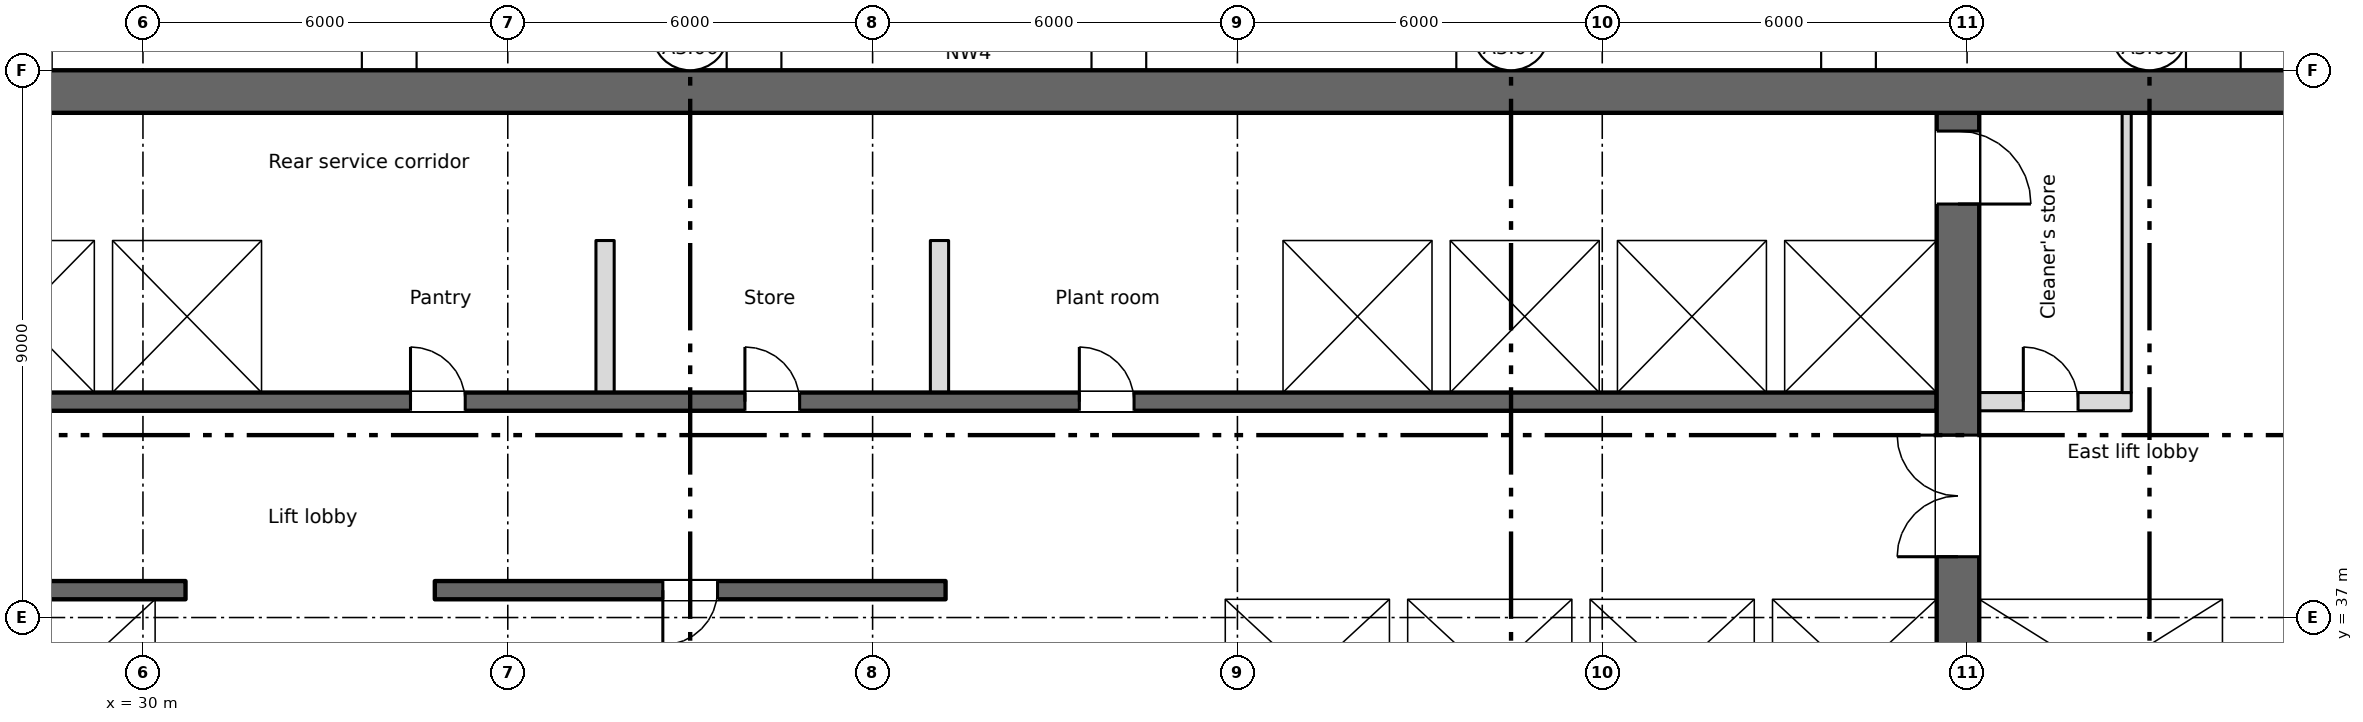
"""IFC4 building model, lengths in metres.
Left out: names, types, materials, properties, quantities, classifications, styles, units other than length and angle.
Written with IfcOpenShell. Run it as: python <this file> out.ifc"""

import sys

from ifc_helpers import new_model, si_unit, direction, frame, frame_2d, origin, place, context, subcontext, project, spatial, rectangle, extrude, element, fill, save


model = new_model("IFC4")
c1 = context("Model", 3, precision=1e-05, world=origin(), true_north=direction((0.0, 1.0)))
c2 = subcontext(c1, "Body", "Model", "MODEL_VIEW")
j1 = project(units=[si_unit("LENGTHUNIT", "METRE"), si_unit("PLANEANGLEUNIT", "RADIAN")], contexts=[c1])
p1 = place(None, origin())
s1 = spatial("IfcSite", under=j1, at=p1, CompositionType="ELEMENT")
p2 = place(p1, origin())
s2 = spatial("IfcBuilding", under=s1, at=p2, CompositionType="ELEMENT")
p3 = place(p2, frame((0.0, 0.0, 166.75)))
s3 = spatial("IfcBuildingStorey", under=s2, at=p3, CompositionType="ELEMENT", Elevation=166.75)
p4 = place(p3, frame((11.55, 45.65, 0.0), z_axis=(0.0, 0.0, 1.0), x_axis=(1.0, 0.0, 0.0)))
e1 = element("IfcWall", 1, at=p4, inside=s3, PredefinedType="SHEAR", context=c2, shape_type="SweptSolid", body=[
    extrude(rectangle(XDim=54.9, YDim=0.7, at=frame_2d((27.45, 0.0))), origin(), (0.0, 0.0, 1.0), 3.35),
])
p5 = place(p3, frame((64.35, 34.8, 0.0), z_axis=(0.0, 0.0, 1.0), x_axis=(0.0, 1.0, 0.0)))
e2 = element("IfcWall", 2, at=p5, inside=s3, PredefinedType="SHEAR", context=c2, shape_type="SweptSolid", body=[
    extrude(rectangle(XDim=10.5, YDim=0.3, at=frame_2d((5.25, 0.0))), origin(), (0.0, 0.0, 1.0), 3.35),
])
p6 = place(p3, frame((59.85, 28.4, 0.0), z_axis=(0.0, 0.0, 1.0), x_axis=(0.0, 1.0, 0.0)))
e3 = element("IfcWall", 3, at=p6, inside=s3, PredefinedType="SHEAR", context=c2, shape_type="SweptSolid", body=[
    extrude(rectangle(XDim=16.9, YDim=0.7, at=frame_2d((8.45, 0.0))), origin(), (0.0, 0.0, 1.0), 3.35),
])
p7 = place(p6, frame((9.6, 0.0, 0.0)))
e4 = element("IfcOpeningElement", 4, at=p7, cuts=e3, PredefinedType="OPENING", context=c2, shape_type="SweptSolid", body=[
    extrude(rectangle(XDim=2.0, YDim=2.1, at=frame_2d((1.0, 1.05))), frame((0.0, 0.36, 0.0), z_axis=(0.0, -1.0, 0.0), x_axis=(1.0, 0.0, 0.0)), (0.0, 0.0, 1.0), 0.72),
])
p8 = place(p6, frame((15.4, 0.0, 0.0)))
e5 = element("IfcOpeningElement", 5, at=p8, cuts=e3, PredefinedType="OPENING", context=c2, shape_type="SweptSolid", body=[
    extrude(rectangle(XDim=1.2, YDim=2.1, at=frame_2d((0.6, 1.05))), frame((0.0, 0.36, 0.0), z_axis=(0.0, -1.0, 0.0), x_axis=(1.0, 0.0, 0.0)), (0.0, 0.0, 1.0), 0.72),
])
p9 = place(p3, frame((30.7, 37.45, 0.0), z_axis=(0.0, 0.0, 1.0), x_axis=(-1.0, 0.0, 0.0)))
e6 = element("IfcWall", 6, at=p9, inside=s3, PredefinedType="SHEAR", context=c2, shape_type="SweptSolid", body=[
    extrude(rectangle(XDim=12.2, YDim=0.3, at=frame_2d((6.1, 0.0))), origin(), (0.0, 0.0, 1.0), 3.35),
])
p10 = place(p9, frame((7.4, 0.0, 0.0)))
e7 = element("IfcOpeningElement", 7, at=p10, cuts=e6, PredefinedType="OPENING", context=c2, shape_type="SweptSolid", body=[
    extrude(rectangle(XDim=0.9, YDim=2.1, at=frame_2d((0.45, 1.05))), frame((0.0, 0.16, 0.0), z_axis=(0.0, -1.0, 0.0), x_axis=(1.0, 0.0, 0.0)), (0.0, 0.0, 1.0), 0.32),
])
p11 = place(p3, frame((43.2, 37.45, 0.0), z_axis=(0.0, 0.0, 1.0), x_axis=(-1.0, 0.0, 0.0)))
e8 = element("IfcWall", 8, at=p11, inside=s3, PredefinedType="SHEAR", context=c2, shape_type="SweptSolid", body=[
    extrude(rectangle(XDim=8.4, YDim=0.3, at=frame_2d((4.2, 0.0))), origin(), (0.0, 0.0, 1.0), 3.35),
])
p12 = place(p11, frame((3.75, 0.0, 0.0)))
e9 = element("IfcOpeningElement", 9, at=p12, cuts=e8, PredefinedType="OPENING", context=c2, shape_type="SweptSolid", body=[
    extrude(rectangle(XDim=0.9, YDim=2.1, at=frame_2d((0.45, 1.05))), frame((0.0, 0.16, 0.0), z_axis=(0.0, -1.0, 0.0), x_axis=(1.0, 0.0, 0.0)), (0.0, 0.0, 1.0), 0.32),
])
p13 = place(p3, frame((47.3, 37.45, 0.0), z_axis=(0.0, 0.0, 1.0), x_axis=(1.0, 0.0, 0.0)))
e10 = element("IfcWall", 10, at=p13, inside=s3, PredefinedType="SHEAR", context=c2, shape_type="SweptSolid", body=[
    extrude(rectangle(XDim=12.2, YDim=0.3, at=frame_2d((6.1, 0.0))), origin(), (0.0, 0.0, 1.0), 3.35),
])
p14 = place(p13, frame((4.3, 0.0, 0.0)))
e11 = element("IfcOpeningElement", 11, at=p14, cuts=e10, PredefinedType="OPENING", context=c2, shape_type="SweptSolid", body=[
    extrude(rectangle(XDim=1.1, YDim=2.1, at=frame_2d((0.55, 1.05))), frame((0.0, 0.16, 0.0), z_axis=(0.0, -1.0, 0.0), x_axis=(1.0, 0.0, 0.0)), (0.0, 0.0, 1.0), 0.32),
])
p15 = place(p13, frame((7.3, 0.0, 0.0)))
e12 = element("IfcOpeningElement", 12, at=p15, cuts=e10, PredefinedType="OPENING", context=c2, shape_type="SweptSolid", body=[
    extrude(rectangle(XDim=1.1, YDim=2.1, at=frame_2d((0.55, 1.05))), frame((0.0, 0.16, 0.0), z_axis=(0.0, -1.0, 0.0), x_axis=(1.0, 0.0, 0.0)), (0.0, 0.0, 1.0), 0.32),
])
p16 = place(p13, frame((10.3, 0.0, 0.0)))
e13 = element("IfcOpeningElement", 13, at=p16, cuts=e10, PredefinedType="OPENING", context=c2, shape_type="SweptSolid", body=[
    extrude(rectangle(XDim=1.1, YDim=2.1, at=frame_2d((0.55, 1.05))), frame((0.0, 0.16, 0.0), z_axis=(0.0, -1.0, 0.0), x_axis=(1.0, 0.0, 0.0)), (0.0, 0.0, 1.0), 0.32),
])
p17 = place(p3, frame((60.2, 37.45, 0.0), z_axis=(0.0, 0.0, 1.0), x_axis=(1.0, 0.0, 0.0)))
e14 = element("IfcWall", 14, at=p17, inside=s3, PredefinedType="SHEAR", context=c2, shape_type="SweptSolid", body=[
    extrude(rectangle(XDim=4.0, YDim=0.3, at=frame_2d((2.0, 0.0))), origin(), (0.0, 0.0, 1.0), 3.35),
])
p18 = place(p17, frame((1.45, 0.0, 0.0)))
e15 = element("IfcOpeningElement", 15, at=p18, cuts=e14, PredefinedType="OPENING", context=c2, shape_type="SweptSolid", body=[
    extrude(rectangle(XDim=1.1, YDim=2.1, at=frame_2d((0.55, 1.05))), frame((0.0, 0.16, 0.0), z_axis=(0.0, -1.0, 0.0), x_axis=(1.0, 0.0, 0.0)), (0.0, 0.0, 1.0), 0.32),
])
p19 = place(p3, frame((30.45, 34.8, 0.0), z_axis=(0.0, 0.0, 1.0), x_axis=(0.0, 1.0, 0.0)))
e16 = element("IfcWall", 16, at=p19, inside=s3, PredefinedType="SHEAR", context=c2, shape_type="SweptSolid", body=[
    extrude(rectangle(XDim=2.5, YDim=0.5, at=frame_2d((1.25, 0.0))), origin(), (0.0, 0.0, 1.0), 3.35),
])
for number, where, z_axis, x_axis in (
    (17, (34.95, 34.8, 0.0), (0.0, 0.0, 1.0), (0.0, 1.0, 0.0)),
    (18, (43.05, 34.8, 0.0), (0.0, 0.0, 1.0), (0.0, 1.0, 0.0)),
):
    element("IfcWall", number, at=place(p3, frame(where, z_axis=z_axis, x_axis=x_axis)), inside=s3, PredefinedType="SHEAR", context=c2, shape_type="SweptSolid", body=[
        extrude(rectangle(XDim=2.5, YDim=0.3, at=frame_2d((1.25, 0.0))), origin(), (0.0, 0.0, 1.0), 3.35),
    ])
p20 = place(p3, frame((47.55, 34.8, 0.0), z_axis=(0.0, 0.0, 1.0), x_axis=(0.0, 1.0, 0.0)))
e19 = element("IfcWall", 19, at=p20, inside=s3, PredefinedType="SHEAR", context=c2, shape_type="SweptSolid", body=[
    extrude(rectangle(XDim=2.5, YDim=0.5, at=frame_2d((1.25, 0.0))), origin(), (0.0, 0.0, 1.0), 3.35),
])
p21 = place(p3, frame((50.65, 34.8, 0.0), z_axis=(0.0, 0.0, 1.0), x_axis=(0.0, 1.0, 0.0)))
e20 = element("IfcWall", 20, at=p21, inside=s3, PredefinedType="SHEAR", context=c2, shape_type="SweptSolid", body=[
    extrude(rectangle(XDim=2.5, YDim=0.3, at=frame_2d((1.25, 0.0))), origin(), (0.0, 0.0, 1.0), 3.35),
])
p22 = place(p3, frame((18.5, 40.55, 0.0), z_axis=(0.0, 0.0, 1.0), x_axis=(1.0, 0.0, 0.0)))
e21 = element("IfcWall", 21, at=p22, inside=s3, PredefinedType="SHEAR", context=c2, shape_type="SweptSolid", body=[
    extrude(rectangle(XDim=41.0, YDim=0.3, at=frame_2d((20.5, 0.0))), origin(), (0.0, 0.0, 1.0), 3.35),
])
p23 = place(p22, frame((2.15, 0.0, 0.0)))
e22 = element("IfcOpeningElement", 22, at=p23, cuts=e21, PredefinedType="OPENING", context=c2, shape_type="SweptSolid", body=[
    extrude(rectangle(XDim=0.9, YDim=2.1, at=frame_2d((0.45, 1.05))), frame((0.0, 0.16, 0.0), z_axis=(0.0, -1.0, 0.0), x_axis=(1.0, 0.0, 0.0)), (0.0, 0.0, 1.0), 0.32),
])
p24 = place(p22, frame((15.9, 0.0, 0.0)))
e23 = element("IfcOpeningElement", 23, at=p24, cuts=e21, PredefinedType="OPENING", context=c2, shape_type="SweptSolid", body=[
    extrude(rectangle(XDim=0.9, YDim=2.1, at=frame_2d((0.45, 1.05))), frame((0.0, 0.16, 0.0), z_axis=(0.0, -1.0, 0.0), x_axis=(1.0, 0.0, 0.0)), (0.0, 0.0, 1.0), 0.32),
])
p25 = place(p22, frame((21.4, 0.0, 0.0)))
e24 = element("IfcOpeningElement", 24, at=p25, cuts=e21, PredefinedType="OPENING", context=c2, shape_type="SweptSolid", body=[
    extrude(rectangle(XDim=0.9, YDim=2.1, at=frame_2d((0.45, 1.05))), frame((0.0, 0.16, 0.0), z_axis=(0.0, -1.0, 0.0), x_axis=(1.0, 0.0, 0.0)), (0.0, 0.0, 1.0), 0.32),
])
p26 = place(p22, frame((26.9, 0.0, 0.0)))
e25 = element("IfcOpeningElement", 25, at=p26, cuts=e21, PredefinedType="OPENING", context=c2, shape_type="SweptSolid", body=[
    extrude(rectangle(XDim=0.9, YDim=2.1, at=frame_2d((0.45, 1.05))), frame((0.0, 0.16, 0.0), z_axis=(0.0, -1.0, 0.0), x_axis=(1.0, 0.0, 0.0)), (0.0, 0.0, 1.0), 0.32),
])
p27 = place(p22, frame((6.175, 0.0, 0.0)))
e26 = element("IfcOpeningElement", 26, at=p27, cuts=e21, PredefinedType="OPENING", context=c2, shape_type="SweptSolid", body=[
    extrude(rectangle(XDim=1.1, YDim=2.1, at=frame_2d((0.55, 1.05))), frame((0.0, 0.16, 0.0), z_axis=(0.0, -1.0, 0.0), x_axis=(1.0, 0.0, 0.0)), (0.0, 0.0, 1.0), 0.32),
])
p28 = place(p22, frame((8.925, 0.0, 0.0)))
e27 = element("IfcOpeningElement", 27, at=p28, cuts=e21, PredefinedType="OPENING", context=c2, shape_type="SweptSolid", body=[
    extrude(rectangle(XDim=1.1, YDim=2.1, at=frame_2d((0.55, 1.05))), frame((0.0, 0.16, 0.0), z_axis=(0.0, -1.0, 0.0), x_axis=(1.0, 0.0, 0.0)), (0.0, 0.0, 1.0), 0.32),
])
p29 = place(p22, frame((11.675, 0.0, 0.0)))
e28 = element("IfcOpeningElement", 28, at=p29, cuts=e21, PredefinedType="OPENING", context=c2, shape_type="SweptSolid", body=[
    extrude(rectangle(XDim=1.1, YDim=2.1, at=frame_2d((0.55, 1.05))), frame((0.0, 0.16, 0.0), z_axis=(0.0, -1.0, 0.0), x_axis=(1.0, 0.0, 0.0)), (0.0, 0.0, 1.0), 0.32),
])
p30 = place(p22, frame((30.925, 0.0, 0.0)))
e29 = element("IfcOpeningElement", 29, at=p30, cuts=e21, PredefinedType="OPENING", context=c2, shape_type="SweptSolid", body=[
    extrude(rectangle(XDim=1.1, YDim=2.1, at=frame_2d((0.55, 1.05))), frame((0.0, 0.16, 0.0), z_axis=(0.0, -1.0, 0.0), x_axis=(1.0, 0.0, 0.0)), (0.0, 0.0, 1.0), 0.32),
])
p31 = place(p22, frame((33.675, 0.0, 0.0)))
e30 = element("IfcOpeningElement", 30, at=p31, cuts=e21, PredefinedType="OPENING", context=c2, shape_type="SweptSolid", body=[
    extrude(rectangle(XDim=1.1, YDim=2.1, at=frame_2d((0.55, 1.05))), frame((0.0, 0.16, 0.0), z_axis=(0.0, -1.0, 0.0), x_axis=(1.0, 0.0, 0.0)), (0.0, 0.0, 1.0), 0.32),
])
p32 = place(p22, frame((36.375, 0.0, 0.0)))
e31 = element("IfcOpeningElement", 31, at=p32, cuts=e21, PredefinedType="OPENING", context=c2, shape_type="SweptSolid", body=[
    extrude(rectangle(XDim=1.2, YDim=2.1, at=frame_2d((0.6, 1.05))), frame((0.0, 0.16, 0.0), z_axis=(0.0, -1.0, 0.0), x_axis=(1.0, 0.0, 0.0)), (0.0, 0.0, 1.0), 0.32),
])
p33 = place(p22, frame((39.15, 0.0, 0.0)))
e32 = element("IfcOpeningElement", 32, at=p33, cuts=e21, PredefinedType="OPENING", context=c2, shape_type="SweptSolid", body=[
    extrude(rectangle(XDim=1.2, YDim=2.1, at=frame_2d((0.6, 1.05))), frame((0.0, 0.16, 0.0), z_axis=(0.0, -1.0, 0.0), x_axis=(1.0, 0.0, 0.0)), (0.0, 0.0, 1.0), 0.32),
])
p34 = place(p3, frame((18.5, 43.35, 0.0), z_axis=(0.0, 0.0, 1.0), x_axis=(1.0, 0.0, 0.0)))
e33 = element("IfcWall", 33, at=p34, inside=s3, PredefinedType="SHEAR", context=c2, shape_type="SweptSolid", body=[
    extrude(rectangle(XDim=41.0, YDim=0.3, at=frame_2d((20.5, 0.0))), origin(), (0.0, 0.0, 1.0), 3.35),
])
p35 = place(p3, frame((60.2, 40.55, 0.0), z_axis=(0.0, 0.0, 1.0), x_axis=(1.0, 0.0, 0.0)))
e34 = element("IfcWall", 34, at=p35, inside=s3, PredefinedType="PARTITIONING", context=c2, shape_type="SweptSolid", body=[
    extrude(rectangle(XDim=2.5, YDim=0.3, at=frame_2d((1.25, 0.0))), origin(), (0.0, 0.0, 1.0), 3.35),
])
p36 = place(p35, frame((0.725, 0.0, 0.0)))
e35 = element("IfcOpeningElement", 35, at=p36, cuts=e34, PredefinedType="OPENING", context=c2, shape_type="SweptSolid", body=[
    extrude(rectangle(XDim=0.9, YDim=2.1, at=frame_2d((0.45, 1.05))), frame((0.0, 0.16, 0.0), z_axis=(0.0, -1.0, 0.0), x_axis=(1.0, 0.0, 0.0)), (0.0, 0.0, 1.0), 0.32),
])
for number, where, z_axis, x_axis in (
    (36, (53.65, 34.8, 0.0), (0.0, 0.0, 1.0), (0.0, 1.0, 0.0)),
    (37, (56.65, 34.8, 0.0), (0.0, 0.0, 1.0), (0.0, 1.0, 0.0)),
    (38, (29.35, 40.7, 0.0), (0.0, 0.0, 1.0), (0.0, 1.0, 0.0)),
    (39, (32.1, 40.7, 0.0), (0.0, 0.0, 1.0), (0.0, 1.0, 0.0)),
    (40, (48.6, 40.7, 0.0), (0.0, 0.0, 1.0), (0.0, 1.0, 0.0)),
    (41, (51.35, 40.7, 0.0), (0.0, 0.0, 1.0), (0.0, 1.0, 0.0)),
    (42, (54.1, 40.7, 0.0), (0.0, 0.0, 1.0), (0.0, 1.0, 0.0)),
    (43, (56.85, 40.7, 0.0), (0.0, 0.0, 1.0), (0.0, 1.0, 0.0)),
):
    element("IfcWall", number, at=place(p3, frame(where, z_axis=z_axis, x_axis=x_axis)), inside=s3, PredefinedType="SHEAR", context=c2, shape_type="SweptSolid", body=[
        extrude(rectangle(XDim=2.5, YDim=0.3, at=frame_2d((1.25, 0.0))), origin(), (0.0, 0.0, 1.0), 3.35),
    ])
p37 = place(p3, frame((62.625, 40.7, 0.0), z_axis=(0.0, 0.0, 1.0), x_axis=(0.0, 1.0, 0.0)))
e44 = element("IfcWall", 44, at=p37, inside=s3, PredefinedType="PARTITIONING", context=c2, shape_type="SweptSolid", body=[
    extrude(rectangle(XDim=4.6, YDim=0.15, at=frame_2d((2.3, 0.0))), origin(), (0.0, 0.0, 1.0), 3.35),
])
for number, where, z_axis, x_axis in (
    (45, (37.6, 40.7, 0.0), (0.0, 0.0, 1.0), (0.0, 1.0, 0.0)),
    (46, (43.1, 40.7, 0.0), (0.0, 0.0, 1.0), (0.0, 1.0, 0.0)),
):
    element("IfcWall", number, at=place(p3, frame(where, z_axis=z_axis, x_axis=x_axis)), inside=s3, PredefinedType="PARTITIONING", context=c2, shape_type="SweptSolid", body=[
        extrude(rectangle(XDim=2.5, YDim=0.3, at=frame_2d((1.25, 0.0))), origin(), (0.0, 0.0, 1.0), 3.35),
    ])
p38 = place(p36, origin())
e47 = element("IfcDoor", 47, at=p38, inside=s3, OperationType="SINGLE_SWING_LEFT", PredefinedType="DOOR", context=c2, shape_type="SweptSolid", body=[
    extrude(rectangle(XDim=0.9, YDim=2.1, at=frame_2d((0.45, 1.05))), frame((0.0, 0.025, 0.0), z_axis=(0.0, -1.0, 0.0), x_axis=(1.0, 0.0, 0.0)), (0.0, 0.0, 1.0), 0.05),
])
fill(e35, e47)
p39 = place(p12, origin())
e48 = element("IfcDoor", 48, at=p39, inside=s3, OperationType="SINGLE_SWING_RIGHT", PredefinedType="DOOR", context=c2, shape_type="SweptSolid", body=[
    extrude(rectangle(XDim=0.9, YDim=2.1, at=frame_2d((0.45, 1.05))), frame((0.0, 0.025, 0.0), z_axis=(0.0, -1.0, 0.0), x_axis=(1.0, 0.0, 0.0)), (0.0, 0.0, 1.0), 0.05),
])
fill(e9, e48)
p40 = place(p24, origin())
e49 = element("IfcDoor", 49, at=p40, inside=s3, OperationType="SINGLE_SWING_LEFT", PredefinedType="DOOR", context=c2, shape_type="SweptSolid", body=[
    extrude(rectangle(XDim=0.9, YDim=2.1, at=frame_2d((0.45, 1.05))), frame((0.0, 0.025, 0.0), z_axis=(0.0, -1.0, 0.0), x_axis=(1.0, 0.0, 0.0)), (0.0, 0.0, 1.0), 0.05),
])
fill(e23, e49)
p41 = place(p25, origin())
e50 = element("IfcDoor", 50, at=p41, inside=s3, OperationType="SINGLE_SWING_LEFT", PredefinedType="DOOR", context=c2, shape_type="SweptSolid", body=[
    extrude(rectangle(XDim=0.9, YDim=2.1, at=frame_2d((0.45, 1.05))), frame((0.0, 0.025, 0.0), z_axis=(0.0, -1.0, 0.0), x_axis=(1.0, 0.0, 0.0)), (0.0, 0.0, 1.0), 0.05),
])
fill(e24, e50)
p42 = place(p26, origin())
e51 = element("IfcDoor", 51, at=p42, inside=s3, OperationType="SINGLE_SWING_LEFT", PredefinedType="DOOR", context=c2, shape_type="SweptSolid", body=[
    extrude(rectangle(XDim=0.9, YDim=2.1, at=frame_2d((0.45, 1.05))), frame((0.0, 0.025, 0.0), z_axis=(0.0, -1.0, 0.0), x_axis=(1.0, 0.0, 0.0)), (0.0, 0.0, 1.0), 0.05),
])
fill(e25, e51)
p43 = place(p14, origin())
e52 = element("IfcDoor", 52, at=p43, inside=s3, OperationType="SLIDING_TO_LEFT", PredefinedType="DOOR", context=c2, shape_type="SweptSolid", body=[
    extrude(rectangle(XDim=1.1, YDim=2.1, at=frame_2d((0.55, 1.05))), frame((0.0, 0.025, 0.0), z_axis=(0.0, -1.0, 0.0), x_axis=(1.0, 0.0, 0.0)), (0.0, 0.0, 1.0), 0.05),
])
fill(e11, e52)
p44 = place(p15, origin())
e53 = element("IfcDoor", 53, at=p44, inside=s3, OperationType="SLIDING_TO_LEFT", PredefinedType="DOOR", context=c2, shape_type="SweptSolid", body=[
    extrude(rectangle(XDim=1.1, YDim=2.1, at=frame_2d((0.55, 1.05))), frame((0.0, 0.025, 0.0), z_axis=(0.0, -1.0, 0.0), x_axis=(1.0, 0.0, 0.0)), (0.0, 0.0, 1.0), 0.05),
])
fill(e12, e53)
p45 = place(p16, origin())
e54 = element("IfcDoor", 54, at=p45, inside=s3, OperationType="SLIDING_TO_LEFT", PredefinedType="DOOR", context=c2, shape_type="SweptSolid", body=[
    extrude(rectangle(XDim=1.1, YDim=2.1, at=frame_2d((0.55, 1.05))), frame((0.0, 0.025, 0.0), z_axis=(0.0, -1.0, 0.0), x_axis=(1.0, 0.0, 0.0)), (0.0, 0.0, 1.0), 0.05),
])
fill(e13, e54)
p46 = place(p28, origin())
e55 = element("IfcDoor", 55, at=p46, inside=s3, OperationType="SLIDING_TO_LEFT", PredefinedType="DOOR", context=c2, shape_type="SweptSolid", body=[
    extrude(rectangle(XDim=1.1, YDim=2.1, at=frame_2d((0.55, 1.05))), frame((0.0, 0.025, 0.0), z_axis=(0.0, -1.0, 0.0), x_axis=(1.0, 0.0, 0.0)), (0.0, 0.0, 1.0), 0.05),
])
fill(e27, e55)
p47 = place(p29, origin())
e56 = element("IfcDoor", 56, at=p47, inside=s3, OperationType="SLIDING_TO_LEFT", PredefinedType="DOOR", context=c2, shape_type="SweptSolid", body=[
    extrude(rectangle(XDim=1.1, YDim=2.1, at=frame_2d((0.55, 1.05))), frame((0.0, 0.025, 0.0), z_axis=(0.0, -1.0, 0.0), x_axis=(1.0, 0.0, 0.0)), (0.0, 0.0, 1.0), 0.05),
])
fill(e28, e56)
p48 = place(p30, origin())
e57 = element("IfcDoor", 57, at=p48, inside=s3, OperationType="SLIDING_TO_LEFT", PredefinedType="DOOR", context=c2, shape_type="SweptSolid", body=[
    extrude(rectangle(XDim=1.1, YDim=2.1, at=frame_2d((0.55, 1.05))), frame((0.0, 0.025, 0.0), z_axis=(0.0, -1.0, 0.0), x_axis=(1.0, 0.0, 0.0)), (0.0, 0.0, 1.0), 0.05),
])
fill(e29, e57)
p49 = place(p31, origin())
e58 = element("IfcDoor", 58, at=p49, inside=s3, OperationType="SLIDING_TO_LEFT", PredefinedType="DOOR", context=c2, shape_type="SweptSolid", body=[
    extrude(rectangle(XDim=1.1, YDim=2.1, at=frame_2d((0.55, 1.05))), frame((0.0, 0.025, 0.0), z_axis=(0.0, -1.0, 0.0), x_axis=(1.0, 0.0, 0.0)), (0.0, 0.0, 1.0), 0.05),
])
fill(e30, e58)
p50 = place(p32, origin())
e59 = element("IfcDoor", 59, at=p50, inside=s3, OperationType="SLIDING_TO_LEFT", PredefinedType="DOOR", context=c2, shape_type="SweptSolid", body=[
    extrude(rectangle(XDim=1.2, YDim=2.1, at=frame_2d((0.6, 1.05))), frame((0.0, 0.025, 0.0), z_axis=(0.0, -1.0, 0.0), x_axis=(1.0, 0.0, 0.0)), (0.0, 0.0, 1.0), 0.05),
])
fill(e31, e59)
p51 = place(p33, origin())
e60 = element("IfcDoor", 60, at=p51, inside=s3, OperationType="SLIDING_TO_LEFT", PredefinedType="DOOR", context=c2, shape_type="SweptSolid", body=[
    extrude(rectangle(XDim=1.2, YDim=2.1, at=frame_2d((0.6, 1.05))), frame((0.0, 0.025, 0.0), z_axis=(0.0, -1.0, 0.0), x_axis=(1.0, 0.0, 0.0)), (0.0, 0.0, 1.0), 0.05),
])
fill(e32, e60)
p52 = place(p18, origin())
e61 = element("IfcDoor", 61, at=p52, inside=s3, OperationType="SLIDING_TO_LEFT", PredefinedType="DOOR", context=c2, shape_type="SweptSolid", body=[
    extrude(rectangle(XDim=1.1, YDim=2.1, at=frame_2d((0.55, 1.05))), frame((0.0, 0.025, 0.0), z_axis=(0.0, -1.0, 0.0), x_axis=(1.0, 0.0, 0.0)), (0.0, 0.0, 1.0), 0.05),
])
fill(e15, e61)
p53 = place(p7, origin())
e62 = element("IfcDoor", 62, at=p53, inside=s3, OperationType="DOUBLE_DOOR_SINGLE_SWING", PredefinedType="DOOR", context=c2, shape_type="SweptSolid", body=[
    extrude(rectangle(XDim=2.0, YDim=2.1, at=frame_2d((1.0, 1.05))), frame((0.0, 0.025, 0.0), z_axis=(0.0, -1.0, 0.0), x_axis=(1.0, 0.0, 0.0)), (0.0, 0.0, 1.0), 0.05),
])
fill(e4, e62)
p54 = place(p8, origin())
e63 = element("IfcDoor", 63, at=p54, inside=s3, OperationType="SINGLE_SWING_LEFT", PredefinedType="DOOR", context=c2, shape_type="SweptSolid", body=[
    extrude(rectangle(XDim=1.2, YDim=2.1, at=frame_2d((0.6, 1.05))), frame((0.0, 0.025, 0.0), z_axis=(0.0, -1.0, 0.0), x_axis=(1.0, 0.0, 0.0)), (0.0, 0.0, 1.0), 0.05),
])
fill(e5, e63)
save(model, sys.argv[1])
